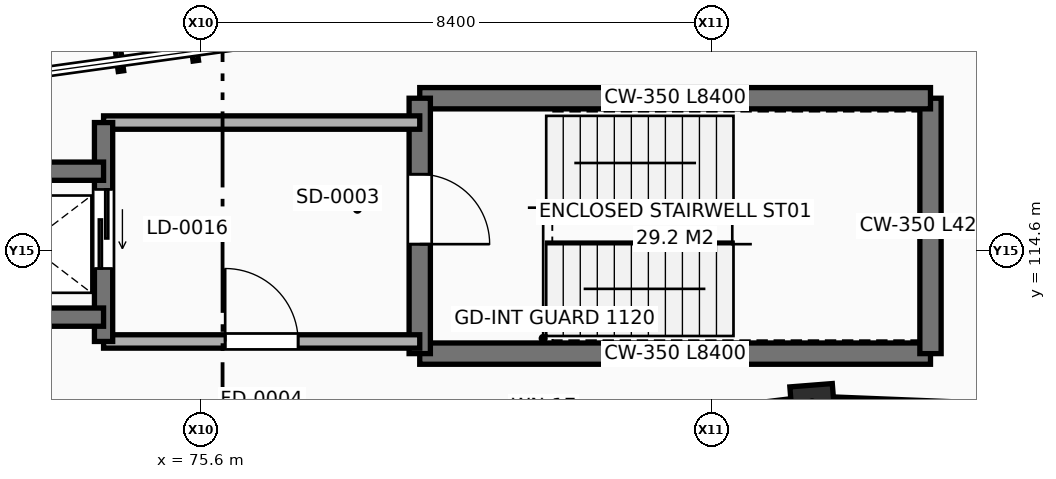
"""IFC4 building model, lengths in metres.
Left out: names, types, materials, properties, quantities, classifications, styles, units other than length and angle.
Written with IfcOpenShell. Run it as: python <this file> out.ifc"""

import sys

from ifc_helpers import new_model, si_unit, direction, frame, frame_2d, origin, origin_2d, place, context, subcontext, project, spatial, rectangle, extrude, element, fill, save


model = new_model("IFC4")
c1 = context("Model", 3, precision=1e-05, world=origin(), true_north=direction((0.0, 1.0)))
c2 = subcontext(c1, "Body", "Model", "MODEL_VIEW")
j1 = project(units=[si_unit("LENGTHUNIT", "METRE"), si_unit("PLANEANGLEUNIT", "RADIAN")], contexts=[c1])
p1 = place(None, origin())
s1 = spatial("IfcSite", under=j1, at=p1, CompositionType="ELEMENT")
p2 = place(p1, origin())
s2 = spatial("IfcBuilding", under=s1, at=p2, CompositionType="ELEMENT")
p3 = place(p2, frame((0.0, 0.0, 5.4)))
s3 = spatial("IfcBuildingStorey", under=s2, at=p3, CompositionType="ELEMENT", Elevation=5.4)
p4 = place(p3, frame((85.664, 112.031, 0.0), z_axis=(0.0, 0.0, 1.0), x_axis=(-0.078459095728, 0.996917333733, 0.0)))
e1 = element("IfcColumn", 1, at=p4, inside=s3, PredefinedType="COLUMN", context=c2, shape_type="SweptSolid", body=[
    extrude(rectangle(XDim=0.7, YDim=0.7, at=origin_2d()), origin(), (0.0, 0.0, 1.0), 4.2),
])
p5 = place(p3, frame((98.912, 111.5, 0.0), z_axis=(0.0, 0.0, 1.0), x_axis=(-0.999198380478, 0.040032442472, 0.0)))
e2 = element("IfcWall", 2, at=p5, inside=s3, PredefinedType="SOLIDWALL", context=c2, shape_type="SweptSolid", body=[
    extrude(rectangle(XDim=12.868, YDim=0.34, at=frame_2d((6.434, 0.0))), origin(), (0.0, 0.0, 1.0), 3.387),
])
p6 = place(p5, frame((3.489, 0.0, 0.9)))
e3 = element("IfcOpeningElement", 3, at=p6, cuts=e2, PredefinedType="OPENING", context=c2, shape_type="SweptSolid", body=[
    extrude(rectangle(XDim=1.2, YDim=2.1, at=frame_2d((0.6, 1.05))), frame((0.0, 0.18, 0.0), z_axis=(0.0, -1.0, 0.0), x_axis=(1.0, 0.0, 0.0)), (0.0, 0.0, 1.0), 0.36),
])
p7 = place(p5, frame((8.179, 0.0, 0.9)))
e4 = element("IfcOpeningElement", 4, at=p7, cuts=e2, PredefinedType="OPENING", context=c2, shape_type="SweptSolid", body=[
    extrude(rectangle(XDim=1.2, YDim=2.1, at=frame_2d((0.6, 1.05))), frame((0.0, 0.18, 0.0), z_axis=(0.0, -1.0, 0.0), x_axis=(1.0, 0.0, 0.0)), (0.0, 0.0, 1.0), 0.36),
])
p8 = place(p3, frame((85.299, 111.987, 0.0), z_axis=(0.0, 0.0, 1.0), x_axis=(-0.992611887603, -0.121332767994, 0.0)))
e5 = element("IfcWall", 5, at=p8, inside=s3, PredefinedType="SOLIDWALL", context=c2, shape_type="SweptSolid", body=[
    extrude(rectangle(XDim=12.624, YDim=0.34, at=frame_2d((6.312, 0.0))), origin(), (0.0, 0.0, 1.0), 3.387),
])
p9 = place(p8, frame((3.475, 0.0, 0.9)))
e6 = element("IfcOpeningElement", 6, at=p9, cuts=e5, PredefinedType="OPENING", context=c2, shape_type="SweptSolid", body=[
    extrude(rectangle(XDim=1.1, YDim=1.8, at=frame_2d((0.55, 0.9))), frame((0.0, 0.18, 0.0), z_axis=(0.0, -1.0, 0.0), x_axis=(1.0, 0.0, 0.0)), (0.0, 0.0, 1.0), 0.36),
])
p10 = place(p8, frame((8.05, 0.0, 0.9)))
e7 = element("IfcOpeningElement", 7, at=p10, cuts=e5, PredefinedType="OPENING", context=c2, shape_type="SweptSolid", body=[
    extrude(rectangle(XDim=1.1, YDim=1.8, at=frame_2d((0.55, 0.9))), frame((0.0, 0.18, 0.0), z_axis=(0.0, -1.0, 0.0), x_axis=(1.0, 0.0, 0.0)), (0.0, 0.0, 1.0), 0.36),
])
p11 = place(p3, frame((79.2, 112.9, 0.0), z_axis=(0.0, 0.0, 1.0), x_axis=(1.0, 0.0, 0.0)))
e8 = element("IfcWall", 8, at=p11, inside=s3, PredefinedType="SHEAR", context=c2, shape_type="SweptSolid", body=[
    extrude(rectangle(XDim=8.4, YDim=0.35, at=frame_2d((4.2, 0.0))), origin(), (0.0, 0.0, 1.0), 3.92),
])
p12 = place(p3, frame((87.6, 112.9, 0.0), z_axis=(0.0, 0.0, 1.0), x_axis=(0.0, 1.0, 0.0)))
e9 = element("IfcWall", 9, at=p12, inside=s3, PredefinedType="SHEAR", context=c2, shape_type="SweptSolid", body=[
    extrude(rectangle(XDim=4.2, YDim=0.35, at=frame_2d((2.1, 0.0))), origin(), (0.0, 0.0, 1.0), 3.92),
])
p13 = place(p3, frame((87.6, 117.1, 0.0), z_axis=(0.0, 0.0, 1.0), x_axis=(-1.0, 0.0, 0.0)))
e10 = element("IfcWall", 10, at=p13, inside=s3, PredefinedType="SHEAR", context=c2, shape_type="SweptSolid", body=[
    extrude(rectangle(XDim=8.4, YDim=0.35, at=frame_2d((4.2, 0.0))), origin(), (0.0, 0.0, 1.0), 3.92),
])
p14 = place(p3, frame((79.2, 117.1, 0.0), z_axis=(0.0, 0.0, 1.0), x_axis=(0.0, -1.0, 0.0)))
e11 = element("IfcWall", 11, at=p14, inside=s3, PredefinedType="SHEAR", context=c2, shape_type="SweptSolid", body=[
    extrude(rectangle(XDim=4.2, YDim=0.35, at=frame_2d((2.1, 0.0))), origin(), (0.0, 0.0, 1.0), 3.92),
])
p15 = place(p14, frame((1.25, 0.0, 0.0)))
e12 = element("IfcOpeningElement", 12, at=p15, cuts=e11, PredefinedType="OPENING", context=c2, shape_type="SweptSolid", body=[
    extrude(rectangle(XDim=1.15, YDim=2.2, at=frame_2d((0.575, 1.1))), frame((0.0, 0.185, 0.0), z_axis=(0.0, -1.0, 0.0), x_axis=(1.0, 0.0, 0.0)), (0.0, 0.0, 1.0), 0.37),
])
p16 = place(p3, frame((74.0, 113.1, 0.0), z_axis=(0.0, 0.0, 1.0), x_axis=(1.0, 0.0, 0.0)))
e13 = element("IfcWall", 13, at=p16, inside=s3, PredefinedType="SOLIDWALL", context=c2, shape_type="SweptSolid", body=[
    extrude(rectangle(XDim=5.2, YDim=0.22, at=frame_2d((2.6, 0.0))), origin(), (0.0, 0.0, 1.0), 3.92),
])
p17 = place(p16, frame((2.0, 0.0, 0.0)))
e14 = element("IfcOpeningElement", 14, at=p17, cuts=e13, PredefinedType="OPENING", context=c2, shape_type="SweptSolid", body=[
    extrude(rectangle(XDim=1.2, YDim=2.2, at=frame_2d((0.6, 1.1))), frame((0.0, 0.12, 0.0), z_axis=(0.0, -1.0, 0.0), x_axis=(1.0, 0.0, 0.0)), (0.0, 0.0, 1.0), 0.24),
])
p18 = place(p3, frame((79.2, 116.7, 0.0), z_axis=(0.0, 0.0, 1.0), x_axis=(-1.0, 0.0, 0.0)))
e15 = element("IfcWall", 15, at=p18, inside=s3, PredefinedType="SOLIDWALL", context=c2, shape_type="SweptSolid", body=[
    extrude(rectangle(XDim=5.2, YDim=0.22, at=frame_2d((2.6, 0.0))), origin(), (0.0, 0.0, 1.0), 3.92),
])
p19 = place(p3, frame((74.0, 116.7, 0.0), z_axis=(0.0, 0.0, 1.0), x_axis=(0.0, -1.0, 0.0)))
e16 = element("IfcWall", 16, at=p19, inside=s3, PredefinedType="SHEAR", context=c2, shape_type="SweptSolid", body=[
    extrude(rectangle(XDim=3.6, YDim=0.3, at=frame_2d((1.8, 0.0))), origin(), (0.0, 0.0, 1.0), 3.92),
])
p20 = place(p19, frame((1.1, 0.0, 0.0)))
e17 = element("IfcOpeningElement", 17, at=p20, cuts=e16, PredefinedType="OPENING", context=c2, shape_type="SweptSolid", body=[
    extrude(rectangle(XDim=1.3, YDim=2.3, at=frame_2d((0.65, 1.15))), frame((0.0, 0.16, 0.0), z_axis=(0.0, -1.0, 0.0), x_axis=(1.0, 0.0, 0.0)), (0.0, 0.0, 1.0), 0.32),
])
for number, where, z_axis, x_axis in (
    (18, (74.0, 115.9, 0.0), (0.0, 0.0, 1.0), (-1.0, 0.0, 0.0)),
    (19, (71.5, 113.5, 0.0), (0.0, 0.0, 1.0), (1.0, 0.0, 0.0)),
):
    element("IfcWall", number, at=place(p3, frame(where, z_axis=z_axis, x_axis=x_axis)), inside=s3, PredefinedType="SHEAR", context=c2, shape_type="SweptSolid", body=[
        extrude(rectangle(XDim=2.5, YDim=0.3, at=frame_2d((1.25, 0.0))), origin(), (0.0, 0.0, 1.0), 3.92),
    ])
p21 = place(p15, origin())
e20 = element("IfcDoor", 20, at=p21, inside=s3, OperationType="SINGLE_SWING_RIGHT", PredefinedType="DOOR", context=c2, shape_type="SweptSolid", body=[
    extrude(rectangle(XDim=1.15, YDim=2.2, at=frame_2d((0.575, 1.1))), frame((0.0, 0.025, 0.0), z_axis=(0.0, -1.0, 0.0), x_axis=(1.0, 0.0, 0.0)), (0.0, 0.0, 1.0), 0.05),
])
fill(e12, e20)
p22 = place(p17, origin())
e21 = element("IfcDoor", 21, at=p22, inside=s3, OperationType="SINGLE_SWING_LEFT", PredefinedType="DOOR", context=c2, shape_type="SweptSolid", body=[
    extrude(rectangle(XDim=1.2, YDim=2.2, at=frame_2d((0.6, 1.1))), frame((0.0, 0.025, 0.0), z_axis=(0.0, -1.0, 0.0), x_axis=(1.0, 0.0, 0.0)), (0.0, 0.0, 1.0), 0.05),
])
fill(e14, e21)
p23 = place(p20, origin())
e22 = element("IfcDoor", 22, at=p23, inside=s3, OperationType="SLIDING_TO_LEFT", PredefinedType="DOOR", context=c2, shape_type="SweptSolid", body=[
    extrude(rectangle(XDim=1.3, YDim=2.3, at=frame_2d((0.65, 1.15))), frame((0.0, 0.025, 0.0), z_axis=(0.0, -1.0, 0.0), x_axis=(1.0, 0.0, 0.0)), (0.0, 0.0, 1.0), 0.05),
])
fill(e17, e22)
save(model, sys.argv[1])
